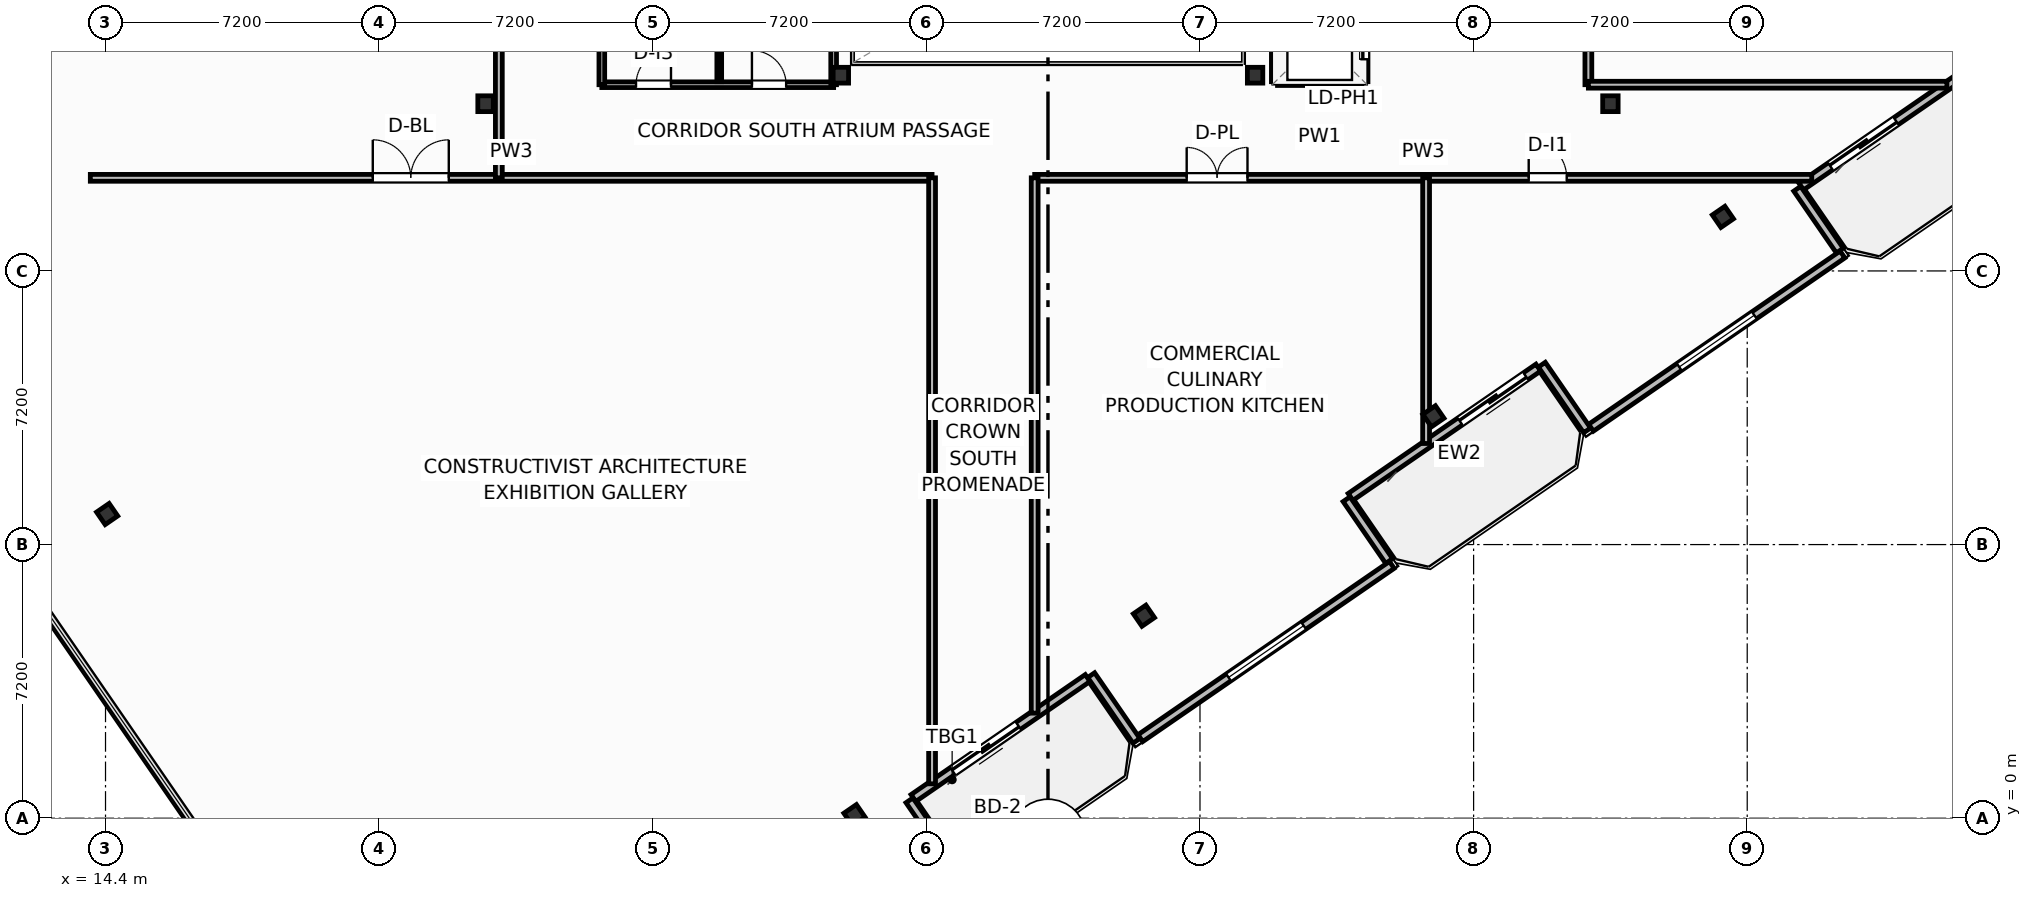
"""IFC4 building model, lengths in metres.
Left out: names, types, materials, properties, quantities, classifications, styles, units other than length and angle.
Written with IfcOpenShell. Run it as: python <this file> out.ifc"""

import sys

from ifc_helpers import new_model, si_unit, direction, frame, frame_2d, origin, origin_2d, place, context, subcontext, project, spatial, rectangle, i_section, extrude, element, fill, save


model = new_model("IFC4")
c1 = context("Model", 3, precision=1e-05, world=origin(), true_north=direction((0.0, 1.0)))
c2 = subcontext(c1, "Body", "Model", "MODEL_VIEW")
j1 = project(units=[si_unit("LENGTHUNIT", "METRE"), si_unit("PLANEANGLEUNIT", "RADIAN")], contexts=[c1])
p1 = place(None, origin())
s1 = spatial("IfcSite", under=j1, at=p1, CompositionType="ELEMENT")
p2 = place(p1, origin())
s2 = spatial("IfcBuilding", under=s1, at=p2, CompositionType="ELEMENT")
p3 = place(p2, frame((0.0, 0.0, 287.8)))
s3 = spatial("IfcBuildingStorey", under=s2, at=p3, CompositionType="ELEMENT", Elevation=287.8)
for number, where, z_axis, x_axis in (
    (1, (33.75, 19.55, 0.0), (0.0, 0.0, 1.0), (1.0, 0.0, 0.0)),
    (2, (44.65, 19.55, 0.0), (0.0, 0.0, 1.0), (1.0, 0.0, 0.0)),
    (3, (24.4, 18.8, 0.0), (0.0, 0.0, 1.0), (1.0, 0.0, 0.0)),
    (4, (54.0, 18.8, 0.0), (0.0, 0.0, 1.0), (1.0, 0.0, 0.0)),
):
    element("IfcColumn", number, at=place(p3, frame(where, z_axis=z_axis, x_axis=x_axis)), inside=s3, PredefinedType="COLUMN", context=c2, shape_type="SweptSolid", body=[
        extrude(i_section(OverallWidth=0.406, OverallDepth=0.416, WebThickness=0.03, FlangeThickness=0.048, FilletRadius=0.025, at=origin_2d()), origin(), (0.0, 0.0, 1.0), 3.7),
    ])
for number, where, z_axis, x_axis in (
    (5, (34.107, 0.081, 0.0), (0.0, 0.0, 1.0), (0.824, 0.567, 0.0)),
    (6, (41.725, 5.328, 0.0), (0.0, 0.0, 1.0), (0.824, 0.567, 0.0)),
    (7, (49.343, 10.575, 0.0), (0.0, 0.0, 1.0), (0.824, 0.567, 0.0)),
    (8, (56.96, 15.823, 0.0), (0.0, 0.0, 1.0), (0.824, 0.567, 0.0)),
    (9, (14.443, 8.004, 0.0), (0.0, 0.0, 1.0), (0.824, 0.567, 0.0)),
):
    element("IfcColumn", number, at=place(p3, frame(where, z_axis=z_axis, x_axis=x_axis)), inside=s3, PredefinedType="COLUMN", context=c2, shape_type="SweptSolid", body=[
        extrude(i_section(OverallWidth=0.401, OverallDepth=0.399, WebThickness=0.025, FlangeThickness=0.04, FilletRadius=0.022, at=origin_2d()), origin(), (0.0, 0.0, 1.0), 3.7),
    ])
p4 = place(p3, frame((40.244, 3.688, 0.0), z_axis=(0.0, 0.0, 1.0), x_axis=(-0.823541290762, -0.567256328665, 0.0)))
e10 = element("IfcWall", 10, at=p4, inside=s3, PredefinedType="SOLIDWALL", context=c2, shape_type="SweptSolid", body=[
    extrude(rectangle(XDim=5.567, YDim=0.22, at=frame_2d((2.784, 0.0))), origin(), (0.0, 0.0, 1.0), 2.66),
])
p5 = place(p4, frame((2.214, 0.0, 0.0)))
e11 = element("IfcOpeningElement", 11, at=p5, cuts=e10, PredefinedType="OPENING", context=c2, shape_type="SweptSolid", body=[
    extrude(rectangle(XDim=2.1, YDim=2.3, at=frame_2d((1.05, 1.15))), frame((0.0, 0.12, 0.0), z_axis=(0.0, -1.0, 0.0), x_axis=(1.0, 0.0, 0.0)), (0.0, 0.0, 1.0), 0.24),
])
p6 = place(p3, frame((52.103, 11.857, 0.0), z_axis=(0.0, 0.0, 1.0), x_axis=(-0.823534636215, -0.567265989598, 0.0)))
e12 = element("IfcWall", 12, at=p6, inside=s3, PredefinedType="SOLIDWALL", context=c2, shape_type="SweptSolid", body=[
    extrude(rectangle(XDim=6.0, YDim=0.22, at=frame_2d((3.0, 0.0))), origin(), (0.0, 0.0, 1.0), 2.66),
])
p7 = place(p6, frame((0.4, 0.0, 0.0)))
e13 = element("IfcOpeningElement", 13, at=p7, cuts=e12, PredefinedType="OPENING", context=c2, shape_type="SweptSolid", body=[
    extrude(rectangle(XDim=2.1, YDim=2.3, at=frame_2d((1.05, 1.15))), frame((0.0, 0.12, 0.0), z_axis=(0.0, -1.0, 0.0), x_axis=(1.0, 0.0, 0.0)), (0.0, 0.0, 1.0), 0.24),
])
p8 = place(p3, frame((63.605, 19.78, 0.0), z_axis=(0.0, 0.0, 1.0), x_axis=(-0.823541290762, -0.567256328665, 0.0)))
e14 = element("IfcWall", 14, at=p8, inside=s3, PredefinedType="SOLIDWALL", context=c2, shape_type="SweptSolid", body=[
    extrude(rectangle(XDim=5.567, YDim=0.22, at=frame_2d((2.784, 0.0))), origin(), (0.0, 0.0, 1.0), 2.66),
])
p9 = place(p8, frame((2.534, 0.0, 0.0)))
e15 = element("IfcOpeningElement", 15, at=p9, cuts=e14, PredefinedType="OPENING", context=c2, shape_type="SweptSolid", body=[
    extrude(rectangle(XDim=2.1, YDim=2.3, at=frame_2d((1.05, 1.15))), frame((0.0, 0.12, 0.0), z_axis=(0.0, -1.0, 0.0), x_axis=(1.0, 0.0, 0.0)), (0.0, 0.0, 1.0), 0.24),
])
p10 = place(p3, frame((36.675, -1.156, 0.0), z_axis=(0.0, 0.0, 1.0), x_axis=(-0.567215821234, 0.823569190865, 0.0)))
e16 = element("IfcWall", 16, at=p10, inside=s3, PredefinedType="SOLIDWALL", context=c2, shape_type="SweptSolid", body=[
    extrude(rectangle(XDim=1.975, YDim=0.22, at=frame_2d((0.988, 0.0))), origin(), (0.0, 0.0, 1.0), 2.66),
])
p11 = place(p3, frame((40.337, 3.765, 0.0), z_axis=(0.0, 0.0, 1.0), x_axis=(0.567352541689, -0.823475010816, 0.0)))
e17 = element("IfcWall", 17, at=p11, inside=s3, PredefinedType="SOLIDWALL", context=c2, shape_type="SweptSolid", body=[
    extrude(rectangle(XDim=2.1, YDim=0.22, at=frame_2d((1.05, 0.0))), origin(), (0.0, 0.0, 1.0), 2.66),
])
p12 = place(p3, frame((41.631, 2.106, 0.0), z_axis=(0.0, 0.0, 1.0), x_axis=(0.823530942962, 0.56727135128, 0.0)))
e18 = element("IfcWall", 18, at=p12, inside=s3, PredefinedType="SOLIDWALL", context=c2, shape_type="SweptSolid", body=[
    extrude(rectangle(XDim=8.035, YDim=0.22, at=frame_2d((4.018, 0.0))), origin(), (0.0, 0.0, 1.0), 2.66),
])
p13 = place(p12, frame((2.817, 0.0, 0.8)))
e19 = element("IfcOpeningElement", 19, at=p13, cuts=e18, PredefinedType="OPENING", context=c2, shape_type="SweptSolid", body=[
    extrude(rectangle(XDim=2.4, YDim=1.78, at=frame_2d((1.2, 0.89))), frame((0.0, 0.12, 0.0), z_axis=(0.0, -1.0, 0.0), x_axis=(1.0, 0.0, 0.0)), (0.0, 0.0, 1.0), 0.24),
])
p14 = place(p3, frame((48.177, 6.767, 0.0), z_axis=(0.0, 0.0, 1.0), x_axis=(-0.567273565974, 0.823529417415, 0.0)))
e20 = element("IfcWall", 20, at=p14, inside=s3, PredefinedType="SOLIDWALL", context=c2, shape_type="SweptSolid", body=[
    extrude(rectangle(XDim=1.975, YDim=0.22, at=frame_2d((0.988, 0.0))), origin(), (0.0, 0.0, 1.0), 2.66),
])
p15 = place(p3, frame((52.196, 11.933, 0.0), z_axis=(0.0, 0.0, 1.0), x_axis=(0.56729822855, -0.823512428494, 0.0)))
e21 = element("IfcWall", 21, at=p15, inside=s3, PredefinedType="SOLIDWALL", context=c2, shape_type="SweptSolid", body=[
    extrude(rectangle(XDim=2.1, YDim=0.22, at=frame_2d((1.05, 0.0))), origin(), (0.0, 0.0, 1.0), 2.66),
])
p16 = place(p3, frame((53.49, 10.275, 0.0), z_axis=(0.0, 0.0, 1.0), x_axis=(0.823530942962, 0.56727135128, 0.0)))
e22 = element("IfcWall", 22, at=p16, inside=s3, PredefinedType="SOLIDWALL", context=c2, shape_type="SweptSolid", body=[
    extrude(rectangle(XDim=8.035, YDim=0.22, at=frame_2d((4.018, 0.0))), origin(), (0.0, 0.0, 1.0), 2.66),
])
p17 = place(p16, frame((2.817, 0.0, 0.8)))
e23 = element("IfcOpeningElement", 23, at=p17, cuts=e22, PredefinedType="OPENING", context=c2, shape_type="SweptSolid", body=[
    extrude(rectangle(XDim=2.4, YDim=1.78, at=frame_2d((1.2, 0.89))), frame((0.0, 0.12, 0.0), z_axis=(0.0, -1.0, 0.0), x_axis=(1.0, 0.0, 0.0)), (0.0, 0.0, 1.0), 0.24),
])
p18 = place(p3, frame((60.036, 14.936, 0.0), z_axis=(0.0, 0.0, 1.0), x_axis=(-0.567273565974, 0.823529417415, 0.0)))
e24 = element("IfcWall", 24, at=p18, inside=s3, PredefinedType="SOLIDWALL", context=c2, shape_type="SweptSolid", body=[
    extrude(rectangle(XDim=1.975, YDim=0.22, at=frame_2d((0.988, 0.0))), origin(), (0.0, 0.0, 1.0), 2.66),
])
p19 = place(p3, frame((27.46, 19.3, 0.0), z_axis=(0.0, 0.0, 1.0), x_axis=(1.0, 0.0, 0.0)))
e25 = element("IfcWall", 25, at=p19, inside=s3, PredefinedType="PARTITIONING", context=c2, shape_type="SweptSolid", body=[
    extrude(rectangle(XDim=6.1, YDim=0.15, at=frame_2d((3.05, 0.0))), origin(), (0.0, 0.0, 1.0), 2.592),
])
p20 = place(p19, frame((0.9, 0.0, 0.0)))
e26 = element("IfcOpeningElement", 26, at=p20, cuts=e25, PredefinedType="OPENING", context=c2, shape_type="SweptSolid", body=[
    extrude(rectangle(XDim=0.92, YDim=2.05, at=frame_2d((0.46, 1.025))), frame((0.0, 0.085, 0.0), z_axis=(0.0, -1.0, 0.0), x_axis=(1.0, 0.0, 0.0)), (0.0, 0.0, 1.0), 0.17),
])
p21 = place(p19, frame((3.95, 0.0, 0.0)))
e27 = element("IfcOpeningElement", 27, at=p21, cuts=e25, PredefinedType="OPENING", context=c2, shape_type="SweptSolid", body=[
    extrude(rectangle(XDim=0.9, YDim=2.05, at=frame_2d((0.45, 1.025))), frame((0.0, 0.085, 0.0), z_axis=(0.0, -1.0, 0.0), x_axis=(1.0, 0.0, 0.0)), (0.0, 0.0, 1.0), 0.17),
])
p22 = place(p3, frame((30.55, 19.38, 0.0), z_axis=(0.0, 0.0, 1.0), x_axis=(0.0, 1.0, 0.0)))
e28 = element("IfcWall", 28, at=p22, inside=s3, PredefinedType="PARTITIONING", context=c2, shape_type="SweptSolid", body=[
    extrude(rectangle(XDim=7.18, YDim=0.125, at=frame_2d((3.59, 0.0))), origin(), (0.0, 0.0, 1.0), 3.38),
])
p23 = place(p3, frame((27.46, 19.3, 0.0), z_axis=(0.0, 0.0, 1.0), x_axis=(0.0, 1.0, 0.0)))
e29 = element("IfcWall", 29, at=p23, inside=s3, PredefinedType="PARTITIONING", context=c2, shape_type="SweptSolid", body=[
    extrude(rectangle(XDim=7.34, YDim=0.15, at=frame_2d((3.67, 0.0))), origin(), (0.0, 0.0, 1.0), 3.38),
])
p24 = place(p3, frame((33.56, 19.3, 0.0), z_axis=(0.0, 0.0, 1.0), x_axis=(0.0, 1.0, 0.0)))
e30 = element("IfcWall", 30, at=p24, inside=s3, PredefinedType="PARTITIONING", context=c2, shape_type="SweptSolid", body=[
    extrude(rectangle(XDim=7.34, YDim=0.15, at=frame_2d((3.67, 0.0))), origin(), (0.0, 0.0, 1.0), 2.754),
])
p25 = place(p3, frame((14.0, 16.85, 0.0), z_axis=(0.0, 0.0, 1.0), x_axis=(1.0, 0.0, 0.0)))
e31 = element("IfcWall", 31, at=p25, inside=s3, PredefinedType="PARTITIONING", context=c2, shape_type="SweptSolid", body=[
    extrude(rectangle(XDim=22.15, YDim=0.18, at=frame_2d((11.075, 0.0))), origin(), (0.0, 0.0, 1.0), 3.38),
])
p26 = place(p25, frame((7.433, 0.0, 0.0)))
e32 = element("IfcOpeningElement", 32, at=p26, cuts=e31, PredefinedType="OPENING", context=c2, shape_type="SweptSolid", body=[
    extrude(rectangle(XDim=2.0, YDim=2.05, at=frame_2d((1.0, 1.025))), frame((0.0, 0.1, 0.0), z_axis=(0.0, -1.0, 0.0), x_axis=(1.0, 0.0, 0.0)), (0.0, 0.0, 1.0), 0.2),
])
p27 = place(p3, frame((38.85, 16.85, 0.0), z_axis=(0.0, 0.0, 1.0), x_axis=(1.0, 0.0, 0.0)))
e33 = element("IfcWall", 33, at=p27, inside=s3, PredefinedType="PARTITIONING", context=c2, shape_type="SweptSolid", body=[
    extrude(rectangle(XDim=20.448, YDim=0.18, at=frame_2d((10.224, 0.0))), origin(), (0.0, 0.0, 1.0), 3.38),
])
p28 = place(p27, frame((4.0, 0.0, 0.0)))
e34 = element("IfcOpeningElement", 34, at=p28, cuts=e33, PredefinedType="OPENING", context=c2, shape_type="SweptSolid", body=[
    extrude(rectangle(XDim=1.6, YDim=2.05, at=frame_2d((0.8, 1.025))), frame((0.0, 0.1, 0.0), z_axis=(0.0, -1.0, 0.0), x_axis=(1.0, 0.0, 0.0)), (0.0, 0.0, 1.0), 0.2),
])
p29 = place(p27, frame((13.0, 0.0, 0.0)))
e35 = element("IfcOpeningElement", 35, at=p29, cuts=e33, PredefinedType="OPENING", context=c2, shape_type="SweptSolid", body=[
    extrude(rectangle(XDim=1.0, YDim=2.05, at=frame_2d((0.5, 1.025))), frame((0.0, 0.1, 0.0), z_axis=(0.0, -1.0, 0.0), x_axis=(1.0, 0.0, 0.0)), (0.0, 0.0, 1.0), 0.2),
])
p30 = place(p3, frame((36.15, 0.905, 0.0), z_axis=(0.0, 0.0, 1.0), x_axis=(0.0, 1.0, 0.0)))
e36 = element("IfcWall", 36, at=p30, inside=s3, PredefinedType="PARTITIONING", context=c2, shape_type="SweptSolid", body=[
    extrude(rectangle(XDim=15.945, YDim=0.18, at=frame_2d((7.973, 0.0))), origin(), (0.0, 0.0, 1.0), 3.38),
])
p31 = place(p3, frame((38.85, 2.765, 0.0), z_axis=(0.0, 0.0, 1.0), x_axis=(0.0, 1.0, 0.0)))
e37 = element("IfcWall", 37, at=p31, inside=s3, PredefinedType="PARTITIONING", context=c2, shape_type="SweptSolid", body=[
    extrude(rectangle(XDim=14.085, YDim=0.18, at=frame_2d((7.043, 0.0))), origin(), (0.0, 0.0, 1.0), 3.38),
])
p32 = place(p3, frame((49.15, 9.86, 0.0), z_axis=(0.0, 0.0, 1.0), x_axis=(0.0, 1.0, 0.0)))
e38 = element("IfcWall", 38, at=p32, inside=s3, PredefinedType="PARTITIONING", context=c2, shape_type="SweptSolid", body=[
    extrude(rectangle(XDim=6.99, YDim=0.18, at=frame_2d((3.495, 0.0))), origin(), (0.0, 0.0, 1.0), 3.38),
])
p33 = place(p3, frame((24.75, 16.85, 0.0), z_axis=(0.0, 0.0, 1.0), x_axis=(0.0, 1.0, 0.0)))
e39 = element("IfcWall", 39, at=p33, inside=s3, PredefinedType="PARTITIONING", context=c2, shape_type="SweptSolid", body=[
    extrude(rectangle(XDim=23.325, YDim=0.18, at=frame_2d((11.663, 0.0))), origin(), (0.0, 0.0, 1.0), 3.38),
])
p34 = place(p33, frame((6.0, 0.0, 0.0)))
e40 = element("IfcOpeningElement", 40, at=p34, cuts=e39, PredefinedType="OPENING", context=c2, shape_type="SweptSolid", body=[
    extrude(rectangle(XDim=1.0, YDim=2.05, at=frame_2d((0.5, 1.025))), frame((0.0, 0.1, 0.0), z_axis=(0.0, -1.0, 0.0), x_axis=(1.0, 0.0, 0.0)), (0.0, 0.0, 1.0), 0.2),
])
p35 = place(p3, frame((53.42, 19.3, 0.0), z_axis=(0.0, 0.0, 1.0), x_axis=(0.0, 1.0, 0.0)))
e41 = element("IfcWall", 41, at=p35, inside=s3, PredefinedType="PARTITIONING", context=c2, shape_type="SweptSolid", body=[
    extrude(rectangle(XDim=9.68, YDim=0.18, at=frame_2d((4.84, 0.0))), origin(), (0.0, 0.0, 1.0), 3.38),
])
p36 = place(p35, frame((7.4, 0.0, 0.0)))
e42 = element("IfcOpeningElement", 42, at=p36, cuts=e41, PredefinedType="OPENING", context=c2, shape_type="SweptSolid", body=[
    extrude(rectangle(XDim=1.0, YDim=2.05, at=frame_2d((0.5, 1.025))), frame((0.0, 0.1, 0.0), z_axis=(0.0, -1.0, 0.0), x_axis=(1.0, 0.0, 0.0)), (0.0, 0.0, 1.0), 0.2),
])
p37 = place(p3, frame((53.42, 19.3, 0.0), z_axis=(0.0, 0.0, 1.0), x_axis=(1.0, 0.0, 0.0)))
e43 = element("IfcWall", 43, at=p37, inside=s3, PredefinedType="PARTITIONING", context=c2, shape_type="SweptSolid", body=[
    extrude(rectangle(XDim=9.435, YDim=0.18, at=frame_2d((4.718, 0.0))), origin(), (0.0, 0.0, 1.0), 2.669),
])
p38 = place(p3, frame((45.24, 19.38, 0.0), z_axis=(0.0, 0.0, 1.0), x_axis=(1.0, 0.0, 0.0)))
e44 = element("IfcWall", 44, at=p38, inside=s3, PredefinedType="PARTITIONING", context=c2, shape_type="SweptSolid", body=[
    extrude(rectangle(XDim=2.22, YDim=0.2, at=frame_2d((1.11, 0.0))), origin(), (0.0, 0.0, 1.0), 2.592),
])
p39 = place(p3, frame((45.18, 19.38, 0.0), z_axis=(0.0, 0.0, 1.0), x_axis=(0.0, 1.0, 0.0)))
e45 = element("IfcWall", 45, at=p39, inside=s3, PredefinedType="PARTITIONING", context=c2, shape_type="SweptSolid", body=[
    extrude(rectangle(XDim=6.9, YDim=0.2, at=frame_2d((3.45, 0.0))), origin(), (0.0, 0.0, 1.0), 3.38),
])
p40 = place(p3, frame((47.52, 19.38, 0.0), z_axis=(0.0, 0.0, 1.0), x_axis=(0.0, 1.0, 0.0)))
e46 = element("IfcWall", 46, at=p40, inside=s3, PredefinedType="PARTITIONING", context=c2, shape_type="SweptSolid", body=[
    extrude(rectangle(XDim=6.9, YDim=0.2, at=frame_2d((3.45, 0.0))), origin(), (0.0, 0.0, 1.0), 3.38),
])
p41 = place(p40, frame((0.59, 0.0, 0.0)))
e47 = element("IfcOpeningElement", 47, at=p41, cuts=e46, PredefinedType="OPENING", context=c2, shape_type="SweptSolid", body=[
    extrude(rectangle(XDim=1.1, YDim=2.15, at=frame_2d((0.55, 1.075))), frame((0.0, 0.11, 0.0), z_axis=(0.0, -1.0, 0.0), x_axis=(1.0, 0.0, 0.0)), (0.0, 0.0, 1.0), 0.22),
])
p42 = place(p40, frame((2.89, 0.0, 0.0)))
e48 = element("IfcOpeningElement", 48, at=p42, cuts=e46, PredefinedType="OPENING", context=c2, shape_type="SweptSolid", body=[
    extrude(rectangle(XDim=1.1, YDim=2.15, at=frame_2d((0.55, 1.075))), frame((0.0, 0.11, 0.0), z_axis=(0.0, -1.0, 0.0), x_axis=(1.0, 0.0, 0.0)), (0.0, 0.0, 1.0), 0.22),
])
p43 = place(p40, frame((5.19, 0.0, 0.0)))
e49 = element("IfcOpeningElement", 49, at=p43, cuts=e46, PredefinedType="OPENING", context=c2, shape_type="SweptSolid", body=[
    extrude(rectangle(XDim=1.1, YDim=2.15, at=frame_2d((0.55, 1.075))), frame((0.0, 0.11, 0.0), z_axis=(0.0, -1.0, 0.0), x_axis=(1.0, 0.0, 0.0)), (0.0, 0.0, 1.0), 0.22),
])
p44 = place(p5, origin())
e50 = element("IfcDoor", 50, at=p44, inside=s3, OperationType="SLIDING_TO_LEFT", PredefinedType="DOOR", context=c2, shape_type="SweptSolid", body=[
    extrude(rectangle(XDim=2.1, YDim=2.3, at=frame_2d((1.05, 1.15))), frame((0.0, 0.025, 0.0), z_axis=(0.0, -1.0, 0.0), x_axis=(1.0, 0.0, 0.0)), (0.0, 0.0, 1.0), 0.05),
])
fill(e11, e50)
p45 = place(p7, origin())
e51 = element("IfcDoor", 51, at=p45, inside=s3, OperationType="SLIDING_TO_LEFT", PredefinedType="DOOR", context=c2, shape_type="SweptSolid", body=[
    extrude(rectangle(XDim=2.1, YDim=2.3, at=frame_2d((1.05, 1.15))), frame((0.0, 0.025, 0.0), z_axis=(0.0, -1.0, 0.0), x_axis=(1.0, 0.0, 0.0)), (0.0, 0.0, 1.0), 0.05),
])
fill(e13, e51)
p46 = place(p9, origin())
e52 = element("IfcDoor", 52, at=p46, inside=s3, OperationType="SLIDING_TO_LEFT", PredefinedType="DOOR", context=c2, shape_type="SweptSolid", body=[
    extrude(rectangle(XDim=2.1, YDim=2.3, at=frame_2d((1.05, 1.15))), frame((0.0, 0.025, 0.0), z_axis=(0.0, -1.0, 0.0), x_axis=(1.0, 0.0, 0.0)), (0.0, 0.0, 1.0), 0.05),
])
fill(e15, e52)
p47 = place(p13, origin())
e53 = element("IfcWindow", 53, at=p47, inside=s3, PartitioningType="SINGLE_PANEL", PredefinedType="WINDOW", context=c2, shape_type="SweptSolid", body=[
    extrude(rectangle(XDim=2.4, YDim=1.78, at=frame_2d((1.2, 0.89))), frame((0.0, 0.03, 0.0), z_axis=(0.0, -1.0, 0.0), x_axis=(1.0, 0.0, 0.0)), (0.0, 0.0, 1.0), 0.06),
])
fill(e19, e53)
p48 = place(p17, origin())
e54 = element("IfcWindow", 54, at=p48, inside=s3, PartitioningType="SINGLE_PANEL", PredefinedType="WINDOW", context=c2, shape_type="SweptSolid", body=[
    extrude(rectangle(XDim=2.4, YDim=1.78, at=frame_2d((1.2, 0.89))), frame((0.0, 0.03, 0.0), z_axis=(0.0, -1.0, 0.0), x_axis=(1.0, 0.0, 0.0)), (0.0, 0.0, 1.0), 0.06),
])
fill(e23, e54)
p49 = place(p20, origin())
e55 = element("IfcDoor", 55, at=p49, inside=s3, OperationType="SINGLE_SWING_RIGHT", PredefinedType="DOOR", context=c2, shape_type="SweptSolid", body=[
    extrude(rectangle(XDim=0.92, YDim=2.05, at=frame_2d((0.46, 1.025))), frame((0.0, 0.025, 0.0), z_axis=(0.0, -1.0, 0.0), x_axis=(1.0, 0.0, 0.0)), (0.0, 0.0, 1.0), 0.05),
])
fill(e26, e55)
p50 = place(p21, origin())
e56 = element("IfcDoor", 56, at=p50, inside=s3, OperationType="SINGLE_SWING_LEFT", PredefinedType="DOOR", context=c2, shape_type="SweptSolid", body=[
    extrude(rectangle(XDim=0.9, YDim=2.05, at=frame_2d((0.45, 1.025))), frame((0.0, 0.025, 0.0), z_axis=(0.0, -1.0, 0.0), x_axis=(1.0, 0.0, 0.0)), (0.0, 0.0, 1.0), 0.05),
])
fill(e27, e56)
p51 = place(p26, origin())
e57 = element("IfcDoor", 57, at=p51, inside=s3, OperationType="DOUBLE_DOOR_SINGLE_SWING", PredefinedType="DOOR", context=c2, shape_type="SweptSolid", body=[
    extrude(rectangle(XDim=2.0, YDim=2.05, at=frame_2d((1.0, 1.025))), frame((0.0, 0.025, 0.0), z_axis=(0.0, -1.0, 0.0), x_axis=(1.0, 0.0, 0.0)), (0.0, 0.0, 1.0), 0.05),
])
fill(e32, e57)
p52 = place(p28, origin())
e58 = element("IfcDoor", 58, at=p52, inside=s3, OperationType="DOUBLE_DOOR_SINGLE_SWING", PredefinedType="DOOR", context=c2, shape_type="SweptSolid", body=[
    extrude(rectangle(XDim=1.6, YDim=2.05, at=frame_2d((0.8, 1.025))), frame((0.0, 0.025, 0.0), z_axis=(0.0, -1.0, 0.0), x_axis=(1.0, 0.0, 0.0)), (0.0, 0.0, 1.0), 0.05),
])
fill(e34, e58)
p53 = place(p29, origin())
e59 = element("IfcDoor", 59, at=p53, inside=s3, OperationType="SINGLE_SWING_LEFT", PredefinedType="DOOR", context=c2, shape_type="SweptSolid", body=[
    extrude(rectangle(XDim=1.0, YDim=2.05, at=frame_2d((0.5, 1.025))), frame((0.0, 0.025, 0.0), z_axis=(0.0, -1.0, 0.0), x_axis=(1.0, 0.0, 0.0)), (0.0, 0.0, 1.0), 0.05),
])
fill(e35, e59)
p54 = place(p41, origin())
e60 = element("IfcDoor", 60, at=p54, inside=s3, OperationType="SLIDING_TO_LEFT", PredefinedType="DOOR", context=c2, shape_type="SweptSolid", body=[
    extrude(rectangle(XDim=1.1, YDim=2.15, at=frame_2d((0.55, 1.075))), frame((0.0, 0.025, 0.0), z_axis=(0.0, -1.0, 0.0), x_axis=(1.0, 0.0, 0.0)), (0.0, 0.0, 1.0), 0.05),
])
fill(e47, e60)
save(model, sys.argv[1])
